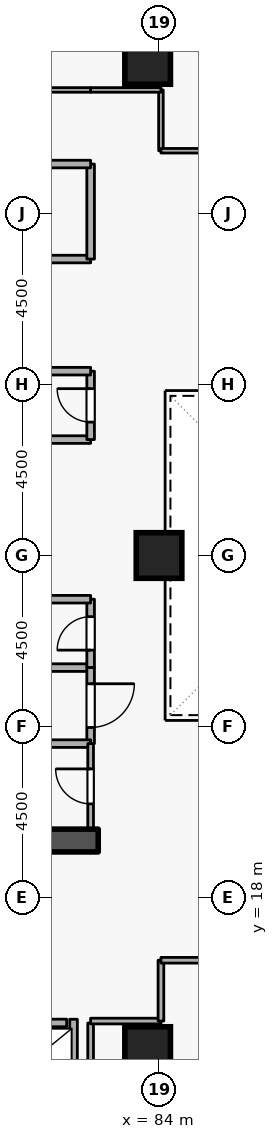
"""IFC4 building model, lengths in metres.
Left out: names, types, materials, properties, quantities, classifications, styles, units other than length and angle.
Written with IfcOpenShell. Run it as: python <this file> out.ifc"""

import sys

from ifc_helpers import new_model, si_unit, direction, frame, frame_2d, origin, origin_2d, place, context, subcontext, project, spatial, rectangle, extrude, element, fill, save


model = new_model("IFC4")
c1 = context("Model", 3, precision=1e-05, world=origin(), true_north=direction((0.0, 1.0)))
c2 = subcontext(c1, "Body", "Model", "MODEL_VIEW")
j1 = project(units=[si_unit("LENGTHUNIT", "METRE"), si_unit("PLANEANGLEUNIT", "RADIAN")], contexts=[c1])
p1 = place(None, origin())
s1 = spatial("IfcSite", under=j1, at=p1, CompositionType="ELEMENT")
p2 = place(p1, origin())
s2 = spatial("IfcBuilding", under=s1, at=p2, CompositionType="ELEMENT")
p3 = place(p2, frame((0.0, 0.0, 83.7)))
s3 = spatial("IfcBuildingStorey", under=s2, at=p3, CompositionType="ELEMENT", Elevation=83.7)
p4 = place(p3, frame((76.7, 19.5, 0.0), z_axis=(0.0, 0.0, 1.0), x_axis=(1.0, 0.0, 0.0)))
e1 = element("IfcWall", 1, at=p4, inside=s3, PredefinedType="SHEAR", context=c2, shape_type="SweptSolid", body=[
    extrude(rectangle(XDim=5.7, YDim=0.6, at=frame_2d((2.85, 0.0))), origin(), (0.0, 0.0, 1.0), 3.6),
])
for number, where, z_axis, x_axis in (
    (2, (83.7, 14.0, 0.0), (0.0, 0.0, 1.0), (1.0, 0.0, 0.0)),
    (3, (83.7, 40.0, 0.0), (0.0, 0.0, 1.0), (1.0, 0.0, 0.0)),
    (4, (84.0, 27.0, 0.0), (0.0, 0.0, 1.0), (1.0, 0.0, 0.0)),
):
    element("IfcColumn", number, at=place(p3, frame(where, z_axis=z_axis, x_axis=x_axis)), inside=s3, PredefinedType="COLUMN", context=c2, shape_type="SweptSolid", body=[
        extrude(rectangle(XDim=1.2, YDim=1.2, at=origin_2d()), origin(), (0.0, 0.0, 1.0), 3.6),
    ])
p5 = place(p3, frame((79.63, 14.7, 0.0), z_axis=(0.0, 0.0, 1.0), x_axis=(1.0, 0.0, 0.0)))
e5 = element("IfcWall", 5, at=p5, inside=s3, PredefinedType="STANDARD", context=c2, shape_type="SweptSolid", body=[
    extrude(rectangle(XDim=1.94, YDim=0.2, at=frame_2d((0.97, 0.0))), origin(), (0.0, 0.0, 1.0), 3.34),
])
p6 = place(p5, frame((0.46, 0.0, 0.0)))
e6 = element("IfcOpeningElement", 6, at=p6, cuts=e5, PredefinedType="OPENING", context=c2, shape_type="SweptSolid", body=[
    extrude(rectangle(XDim=1.02, YDim=2.06, at=frame_2d((0.51, 1.03))), frame((0.0, 0.11, 0.0), z_axis=(0.0, -1.0, 0.0), x_axis=(1.0, 0.0, 0.0)), (0.0, 0.0, 1.0), 0.22),
])
p7 = place(p3, frame((81.75, 12.612, 0.0), z_axis=(0.0, 0.0, 1.0), x_axis=(0.0, 1.0, 0.0)))
e7 = element("IfcWall", 7, at=p7, inside=s3, PredefinedType="STANDARD", context=c2, shape_type="SweptSolid", body=[
    extrude(rectangle(XDim=2.186, YDim=0.2, at=frame_2d((1.093, 0.0))), origin(), (0.0, 0.0, 1.0), 3.34),
])
p8 = place(p3, frame((79.9, 34.8, 0.0), z_axis=(0.0, 0.0, 1.0), x_axis=(1.0, 0.0, 0.0)))
e8 = element("IfcWall", 8, at=p8, inside=s3, PredefinedType="STANDARD", context=c2, shape_type="SweptSolid", body=[
    extrude(rectangle(XDim=2.3, YDim=0.2, at=frame_2d((1.15, 0.0))), origin(), (0.0, 0.0, 1.0), 2.545),
])
p9 = place(p3, frame((82.2, 34.8, 0.0), z_axis=(0.0, 0.0, 1.0), x_axis=(0.0, 1.0, 0.0)))
e9 = element("IfcWall", 9, at=p9, inside=s3, PredefinedType="STANDARD", context=c2, shape_type="SweptSolid", body=[
    extrude(rectangle(XDim=2.5, YDim=0.2, at=frame_2d((1.25, 0.0))), origin(), (0.0, 0.0, 1.0), 3.34),
])
p10 = place(p3, frame((82.2, 37.3, 0.0), z_axis=(0.0, 0.0, 1.0), x_axis=(-1.0, 0.0, 0.0)))
e10 = element("IfcWall", 10, at=p10, inside=s3, PredefinedType="STANDARD", context=c2, shape_type="SweptSolid", body=[
    extrude(rectangle(XDim=5.7, YDim=0.2, at=frame_2d((2.85, 0.0))), origin(), (0.0, 0.0, 1.0), 3.34),
])
p11 = place(p10, frame((2.275, 0.0, 0.0)))
e11 = element("IfcOpeningElement", 11, at=p11, cuts=e10, PredefinedType="OPENING", context=c2, shape_type="SweptSolid", body=[
    extrude(rectangle(XDim=1.15, YDim=2.1, at=frame_2d((0.575, 1.05))), frame((0.0, 0.11, 0.0), z_axis=(0.0, -1.0, 0.0), x_axis=(1.0, 0.0, 0.0)), (0.0, 0.0, 1.0), 0.22),
])
p12 = place(p3, frame((80.15, 24.05, 0.0), z_axis=(0.0, 0.0, 1.0), x_axis=(1.0, 0.0, 0.0)))
e12 = element("IfcWall", 12, at=p12, inside=s3, PredefinedType="STANDARD", context=c2, shape_type="SweptSolid", body=[
    extrude(rectangle(XDim=2.05, YDim=0.2, at=frame_2d((1.025, 0.0))), origin(), (0.0, 0.0, 1.0), 3.34),
])
p13 = place(p3, frame((82.2, 24.05, 0.0), z_axis=(0.0, 0.0, 1.0), x_axis=(0.0, 1.0, 0.0)))
e13 = element("IfcWall", 13, at=p13, inside=s3, PredefinedType="STANDARD", context=c2, shape_type="SweptSolid", body=[
    extrude(rectangle(XDim=1.8, YDim=0.2, at=frame_2d((0.9, 0.0))), origin(), (0.0, 0.0, 1.0), 3.34),
])
p14 = place(p13, frame((0.46, 0.0, 0.0)))
e14 = element("IfcOpeningElement", 14, at=p14, cuts=e13, PredefinedType="OPENING", context=c2, shape_type="SweptSolid", body=[
    extrude(rectangle(XDim=0.88, YDim=2.04, at=frame_2d((0.44, 1.02))), frame((0.0, 0.11, 0.0), z_axis=(0.0, -1.0, 0.0), x_axis=(1.0, 0.0, 0.0)), (0.0, 0.0, 1.0), 0.22),
])
for number, where, z_axis, x_axis in (
    (15, (82.2, 25.85, 0.0), (0.0, 0.0, 1.0), (-1.0, 0.0, 0.0)),
    (16, (80.15, 30.05, 0.0), (0.0, 0.0, 1.0), (1.0, 0.0, 0.0)),
):
    element("IfcWall", number, at=place(p3, frame(where, z_axis=z_axis, x_axis=x_axis)), inside=s3, PredefinedType="STANDARD", context=c2, shape_type="SweptSolid", body=[
        extrude(rectangle(XDim=2.05, YDim=0.2, at=frame_2d((1.025, 0.0))), origin(), (0.0, 0.0, 1.0), 3.34),
    ])
p15 = place(p3, frame((82.2, 30.05, 0.0), z_axis=(0.0, 0.0, 1.0), x_axis=(0.0, 1.0, 0.0)))
e17 = element("IfcWall", 17, at=p15, inside=s3, PredefinedType="STANDARD", context=c2, shape_type="SweptSolid", body=[
    extrude(rectangle(XDim=1.8, YDim=0.2, at=frame_2d((0.9, 0.0))), origin(), (0.0, 0.0, 1.0), 3.34),
])
p16 = place(p15, frame((0.46, 0.0, 0.0)))
e18 = element("IfcOpeningElement", 18, at=p16, cuts=e17, PredefinedType="OPENING", context=c2, shape_type="SweptSolid", body=[
    extrude(rectangle(XDim=0.88, YDim=2.04, at=frame_2d((0.44, 1.02))), frame((0.0, 0.11, 0.0), z_axis=(0.0, -1.0, 0.0), x_axis=(1.0, 0.0, 0.0)), (0.0, 0.0, 1.0), 0.22),
])
p17 = place(p3, frame((82.2, 31.85, 0.0), z_axis=(0.0, 0.0, 1.0), x_axis=(-1.0, 0.0, 0.0)))
e19 = element("IfcWall", 19, at=p17, inside=s3, PredefinedType="STANDARD", context=c2, shape_type="SweptSolid", body=[
    extrude(rectangle(XDim=2.05, YDim=0.2, at=frame_2d((1.025, 0.0))), origin(), (0.0, 0.0, 1.0), 3.34),
])
p18 = place(p3, frame((82.2, 24.05, 0.0), z_axis=(0.0, 0.0, 1.0), x_axis=(0.0, -1.0, 0.0)))
e20 = element("IfcWall", 20, at=p18, inside=s3, PredefinedType="STANDARD", context=c2, shape_type="SweptSolid", body=[
    extrude(rectangle(XDim=2.0, YDim=0.2, at=frame_2d((1.0, 0.0))), origin(), (0.0, 0.0, 1.0), 3.34),
])
p19 = place(p18, frame((0.425, 0.0, 0.0)))
e21 = element("IfcOpeningElement", 21, at=p19, cuts=e20, PredefinedType="OPENING", context=c2, shape_type="SweptSolid", body=[
    extrude(rectangle(XDim=1.15, YDim=2.1, at=frame_2d((0.575, 1.05))), frame((0.0, 0.11, 0.0), z_axis=(0.0, -1.0, 0.0), x_axis=(1.0, 0.0, 0.0)), (0.0, 0.0, 1.0), 0.22),
])
p20 = place(p3, frame((82.2, 22.05, 0.0), z_axis=(0.0, 0.0, 1.0), x_axis=(-1.0, 0.0, 0.0)))
e22 = element("IfcWall", 22, at=p20, inside=s3, PredefinedType="STANDARD", context=c2, shape_type="SweptSolid", body=[
    extrude(rectangle(XDim=2.05, YDim=0.2, at=frame_2d((1.025, 0.0))), origin(), (0.0, 0.0, 1.0), 3.34),
])
p21 = place(p3, frame((82.2, 19.8, 0.0), z_axis=(0.0, 0.0, 1.0), x_axis=(0.0, 1.0, 0.0)))
e23 = element("IfcWall", 23, at=p21, inside=s3, PredefinedType="PARTITIONING", context=c2, shape_type="SweptSolid", body=[
    extrude(rectangle(XDim=2.25, YDim=0.15, at=frame_2d((1.125, 0.0))), origin(), (0.0, 0.0, 1.0), 3.34),
])
p22 = place(p21, frame((0.665, 0.0, 0.0)))
e24 = element("IfcOpeningElement", 24, at=p22, cuts=e23, PredefinedType="OPENING", context=c2, shape_type="SweptSolid", body=[
    extrude(rectangle(XDim=0.92, YDim=2.08, at=frame_2d((0.46, 1.04))), frame((0.0, 0.085, 0.0), z_axis=(0.0, -1.0, 0.0), x_axis=(1.0, 0.0, 0.0)), (0.0, 0.0, 1.0), 0.17),
])
p23 = place(p3, frame((82.2, 12.4, 0.0), z_axis=(0.0, 0.0, 1.0), x_axis=(0.0, 1.0, 0.0)))
e25 = element("IfcWall", 25, at=p23, inside=s3, PredefinedType="PARTITIONING", context=c2, shape_type="SweptSolid", body=[
    extrude(rectangle(XDim=2.3, YDim=0.15, at=frame_2d((1.15, 0.0))), origin(), (0.0, 0.0, 1.0), 3.34),
])
p24 = place(p3, frame((82.2, 14.75, 0.0), z_axis=(0.0, 0.0, 1.0), x_axis=(1.0, 0.0, 0.0)))
e26 = element("IfcWall", 26, at=p24, inside=s3, PredefinedType="PARTITIONING", context=c2, shape_type="SweptSolid", body=[
    extrude(rectangle(XDim=1.85, YDim=0.15, at=frame_2d((0.925, 0.0))), origin(), (0.0, 0.0, 1.0), 3.34),
])
p25 = place(p3, frame((84.05, 14.75, 0.0), z_axis=(0.0, 0.0, 1.0), x_axis=(0.0, 1.0, 0.0)))
e27 = element("IfcWall", 27, at=p25, inside=s3, PredefinedType="PARTITIONING", context=c2, shape_type="SweptSolid", body=[
    extrude(rectangle(XDim=1.6, YDim=0.15, at=frame_2d((0.8, 0.0))), origin(), (0.0, 0.0, 1.0), 3.34),
])
p26 = place(p3, frame((84.05, 16.35, 0.0), z_axis=(0.0, 0.0, 1.0), x_axis=(1.0, 0.0, 0.0)))
e28 = element("IfcWall", 28, at=p26, inside=s3, PredefinedType="PARTITIONING", context=c2, shape_type="SweptSolid", body=[
    extrude(rectangle(XDim=4.45, YDim=0.15, at=frame_2d((2.225, 0.0))), origin(), (0.0, 0.0, 1.0), 3.34),
])
p27 = place(p26, frame((1.575, 0.0, 0.0)))
e29 = element("IfcOpeningElement", 29, at=p27, cuts=e28, PredefinedType="OPENING", context=c2, shape_type="SweptSolid", body=[
    extrude(rectangle(XDim=1.3, YDim=2.12, at=frame_2d((0.65, 1.06))), frame((0.0, 0.085, 0.0), z_axis=(0.0, -1.0, 0.0), x_axis=(1.0, 0.0, 0.0)), (0.0, 0.0, 1.0), 0.17),
])
p28 = place(p3, frame((84.05, 37.65, 0.0), z_axis=(0.0, 0.0, 1.0), x_axis=(0.0, 1.0, 0.0)))
e30 = element("IfcWall", 30, at=p28, inside=s3, PredefinedType="PARTITIONING", context=c2, shape_type="SweptSolid", body=[
    extrude(rectangle(XDim=1.6, YDim=0.12, at=frame_2d((0.8, 0.0))), origin(), (0.0, 0.0, 1.0), 3.34),
])
p29 = place(p3, frame((84.05, 39.25, 0.0), z_axis=(0.0, 0.0, 1.0), x_axis=(-1.0, 0.0, 0.0)))
e31 = element("IfcWall", 31, at=p29, inside=s3, PredefinedType="PARTITIONING", context=c2, shape_type="SweptSolid", body=[
    extrude(rectangle(XDim=1.85, YDim=0.12, at=frame_2d((0.925, 0.0))), origin(), (0.0, 0.0, 1.0), 3.34),
])
p30 = place(p3, frame((82.2, 39.25, 0.0), z_axis=(0.0, 0.0, 1.0), x_axis=(-1.0, 0.0, 0.0)))
e32 = element("IfcWall", 32, at=p30, inside=s3, PredefinedType="PARTITIONING", context=c2, shape_type="SweptSolid", body=[
    extrude(rectangle(XDim=9.35, YDim=0.12, at=frame_2d((4.675, 0.0))), origin(), (0.0, 0.0, 1.0), 3.34),
])
p31 = place(p30, frame((4.15, 0.0, 0.0)))
e33 = element("IfcOpeningElement", 33, at=p31, cuts=e32, PredefinedType="OPENING", context=c2, shape_type="SweptSolid", body=[
    extrude(rectangle(XDim=1.05, YDim=2.1, at=frame_2d((0.525, 1.05))), frame((0.0, 0.07, 0.0), z_axis=(0.0, -1.0, 0.0), x_axis=(1.0, 0.0, 0.0)), (0.0, 0.0, 1.0), 0.14),
])
p32 = place(p3, frame((88.5, 37.65, 0.0), z_axis=(0.0, 0.0, 1.0), x_axis=(-1.0, 0.0, 0.0)))
e34 = element("IfcWall", 34, at=p32, inside=s3, PredefinedType="PARTITIONING", context=c2, shape_type="SweptSolid", body=[
    extrude(rectangle(XDim=4.45, YDim=0.12, at=frame_2d((2.225, 0.0))), origin(), (0.0, 0.0, 1.0), 3.34),
])
p33 = place(p14, origin())
e35 = element("IfcDoor", 35, at=p33, inside=s3, OperationType="SINGLE_SWING_LEFT", PredefinedType="DOOR", context=c2, shape_type="SweptSolid", body=[
    extrude(rectangle(XDim=0.88, YDim=2.04, at=frame_2d((0.44, 1.02))), frame((0.0, 0.025, 0.0), z_axis=(0.0, -1.0, 0.0), x_axis=(1.0, 0.0, 0.0)), (0.0, 0.0, 1.0), 0.05),
])
fill(e14, e35)
p34 = place(p16, origin())
e36 = element("IfcDoor", 36, at=p34, inside=s3, OperationType="SINGLE_SWING_RIGHT", PredefinedType="DOOR", context=c2, shape_type="SweptSolid", body=[
    extrude(rectangle(XDim=0.88, YDim=2.04, at=frame_2d((0.44, 1.02))), frame((0.0, 0.025, 0.0), z_axis=(0.0, -1.0, 0.0), x_axis=(1.0, 0.0, 0.0)), (0.0, 0.0, 1.0), 0.05),
])
fill(e18, e36)
p35 = place(p22, origin())
e37 = element("IfcDoor", 37, at=p35, inside=s3, OperationType="SINGLE_SWING_RIGHT", PredefinedType="DOOR", context=c2, shape_type="SweptSolid", body=[
    extrude(rectangle(XDim=0.92, YDim=2.08, at=frame_2d((0.46, 1.04))), frame((0.0, 0.025, 0.0), z_axis=(0.0, -1.0, 0.0), x_axis=(1.0, 0.0, 0.0)), (0.0, 0.0, 1.0), 0.05),
])
fill(e24, e37)
p36 = place(p19, origin())
e38 = element("IfcDoor", 38, at=p36, inside=s3, OperationType="SINGLE_SWING_LEFT", PredefinedType="DOOR", context=c2, shape_type="SweptSolid", body=[
    extrude(rectangle(XDim=1.15, YDim=2.1, at=frame_2d((0.575, 1.05))), frame((0.0, 0.025, 0.0), z_axis=(0.0, -1.0, 0.0), x_axis=(1.0, 0.0, 0.0)), (0.0, 0.0, 1.0), 0.05),
])
fill(e21, e38)
save(model, sys.argv[1])
